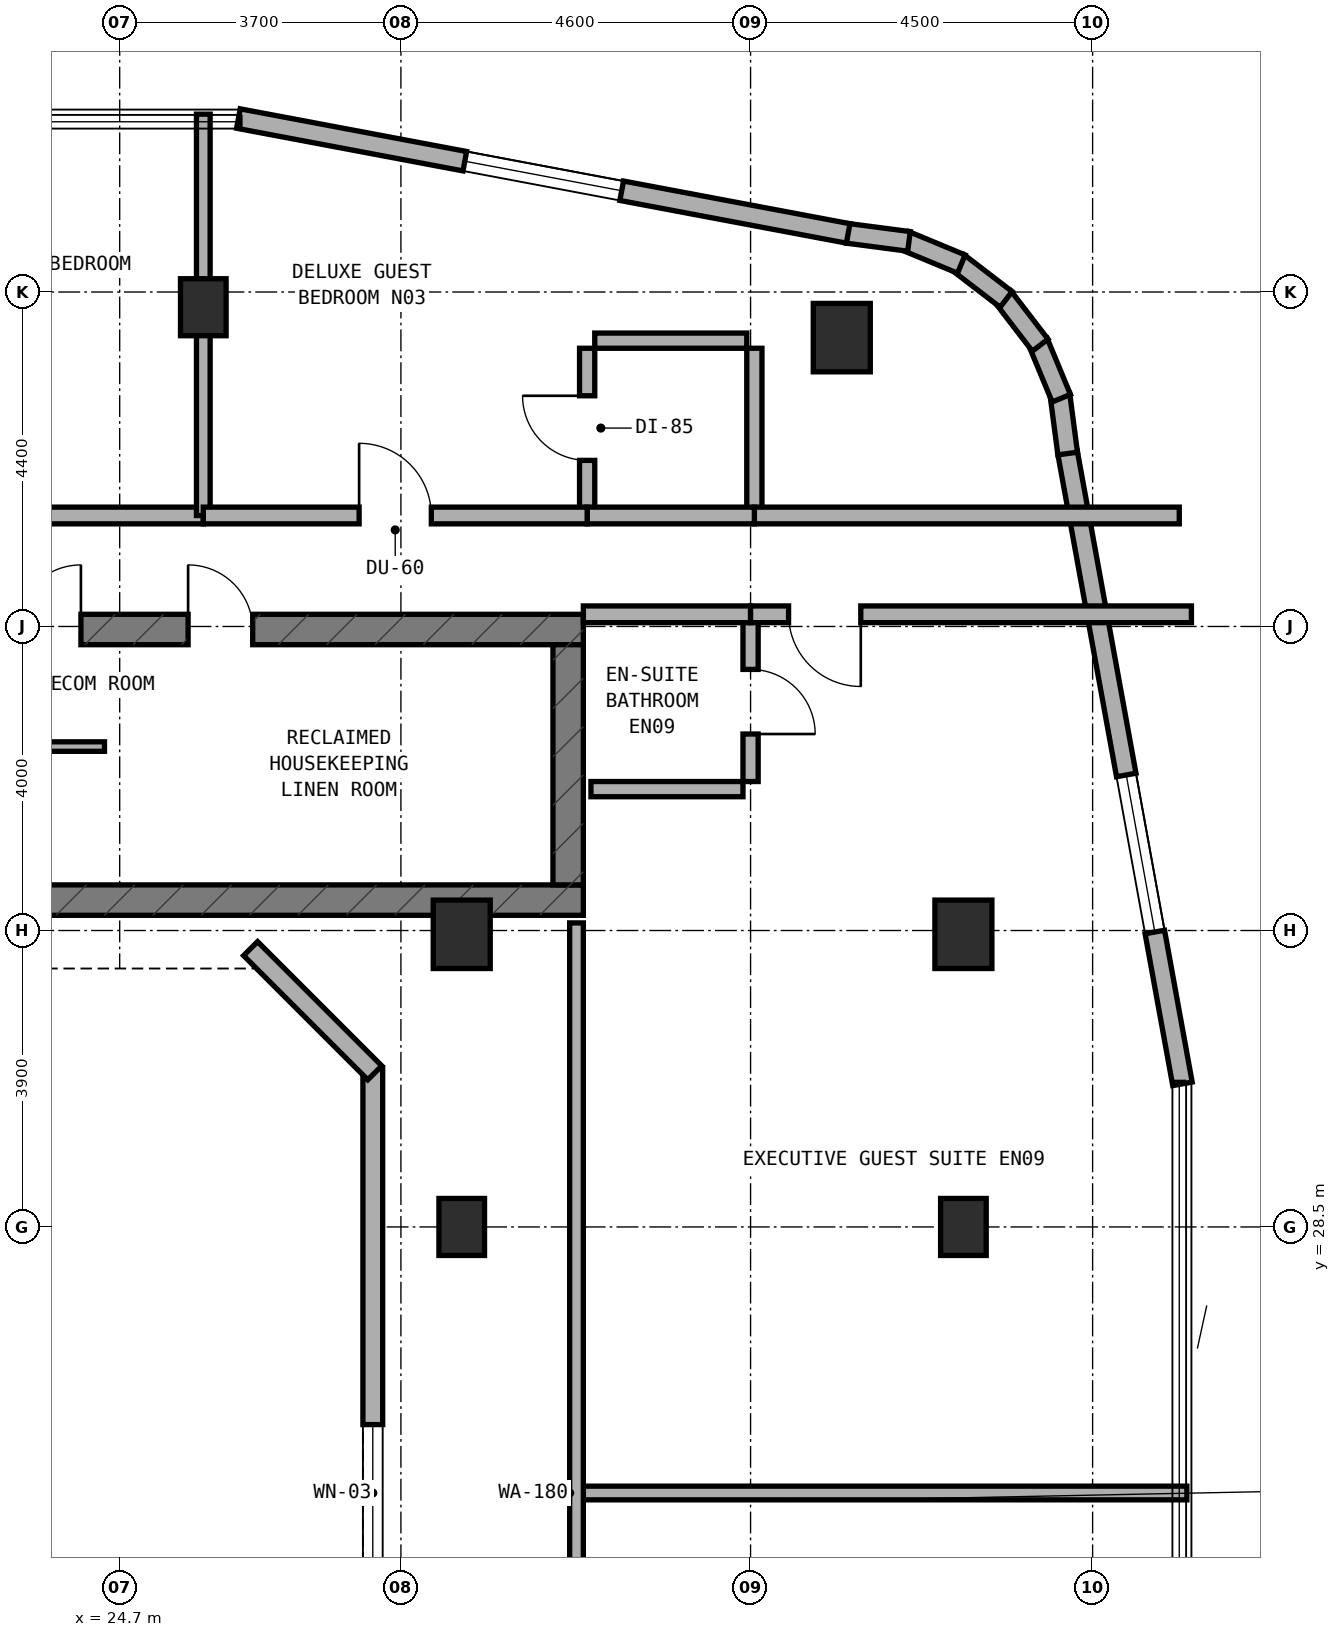
"""IFC4 building model, lengths in metres.
Left out: names, types, materials, properties, quantities, classifications, styles, units other than length and angle.
Written with IfcOpenShell. Run it as: python <this file> out.ifc"""

import sys

from ifc_helpers import new_model, si_unit, direction, frame, frame_2d, origin, origin_2d, place, context, subcontext, project, spatial, rectangle, extrude, element, fill, save


model = new_model("IFC4")
c1 = context("Model", 3, precision=1e-05, world=origin(), true_north=direction((0.0, 1.0)))
c2 = subcontext(c1, "Body", "Model", "MODEL_VIEW")
j1 = project(units=[si_unit("LENGTHUNIT", "METRE"), si_unit("PLANEANGLEUNIT", "RADIAN")], contexts=[c1])
p1 = place(None, origin())
s1 = spatial("IfcSite", under=j1, at=p1, CompositionType="ELEMENT")
p2 = place(p1, origin())
s2 = spatial("IfcBuilding", under=s1, at=p2, CompositionType="ELEMENT")
p3 = place(p2, frame((0.0, 0.0, 250.4)))
s3 = spatial("IfcBuildingStorey", under=s2, at=p3, CompositionType="ELEMENT", Elevation=250.4)
p4 = place(p3, frame((6.4, 32.8, 0.0), z_axis=(0.0, 0.0, 1.0), x_axis=(1.0, 0.0, 0.0)))
e1 = element("IfcWall", 1, at=p4, inside=s3, PredefinedType="SHEAR", context=c2, shape_type="SweptSolid", body=[
    extrude(rectangle(XDim=24.4, YDim=0.4, at=frame_2d((12.2, 0.0))), origin(), (0.0, 0.0, 1.0), 3.6),
])
p5 = place(p4, frame((6.05, 0.0, 0.0)))
e2 = element("IfcOpeningElement", 2, at=p5, cuts=e1, PredefinedType="OPENING", context=c2, shape_type="SweptSolid", body=[
    extrude(rectangle(XDim=1.1, YDim=2.15, at=frame_2d((0.55, 1.075))), frame((0.0, 0.21, 0.0), z_axis=(0.0, -1.0, 0.0), x_axis=(1.0, 0.0, 0.0)), (0.0, 0.0, 1.0), 0.42),
])
p6 = place(p3, frame((6.4, 36.36, 0.0), z_axis=(0.0, 0.0, 1.0), x_axis=(1.0, 0.0, 0.0)))
e3 = element("IfcWall", 3, at=p6, inside=s3, PredefinedType="SHEAR", context=c2, shape_type="SweptSolid", body=[
    extrude(rectangle(XDim=24.4, YDim=0.4, at=frame_2d((12.2, 0.0))), origin(), (0.0, 0.0, 1.0), 3.6),
])
p7 = place(p6, frame((9.15, 0.0, 0.0)))
e4 = element("IfcOpeningElement", 4, at=p7, cuts=e3, PredefinedType="OPENING", context=c2, shape_type="SweptSolid", body=[
    extrude(rectangle(XDim=1.2, YDim=2.15, at=frame_2d((0.6, 1.075))), frame((0.0, 0.21, 0.0), z_axis=(0.0, -1.0, 0.0), x_axis=(1.0, 0.0, 0.0)), (0.0, 0.0, 1.0), 0.42),
])
p8 = place(p6, frame((19.2, 0.0, 0.0)))
e5 = element("IfcOpeningElement", 5, at=p8, cuts=e3, PredefinedType="OPENING", context=c2, shape_type="SweptSolid", body=[
    extrude(rectangle(XDim=0.85, YDim=2.1, at=frame_2d((0.425, 1.05))), frame((0.0, 0.21, 0.0), z_axis=(0.0, -1.0, 0.0), x_axis=(1.0, 0.0, 0.0)), (0.0, 0.0, 1.0), 0.42),
])
p9 = place(p6, frame((16.94, 0.0, 0.0)))
e6 = element("IfcOpeningElement", 6, at=p9, cuts=e3, PredefinedType="OPENING", context=c2, shape_type="SweptSolid", body=[
    extrude(rectangle(XDim=0.85, YDim=2.1, at=frame_2d((0.425, 1.05))), frame((0.0, 0.21, 0.0), z_axis=(0.0, -1.0, 0.0), x_axis=(1.0, 0.0, 0.0)), (0.0, 0.0, 1.0), 0.42),
])
p10 = place(p3, frame((30.6, 33.0, 0.0), z_axis=(0.0, 0.0, 1.0), x_axis=(0.0, 1.0, 0.0)))
e7 = element("IfcWall", 7, at=p10, inside=s3, PredefinedType="SHEAR", context=c2, shape_type="SweptSolid", body=[
    extrude(rectangle(XDim=3.16, YDim=0.4, at=frame_2d((1.58, 0.0))), origin(), (0.0, 0.0, 1.0), 3.6),
])
p11 = place(p3, frame((25.8, 40.6, 0.0), z_axis=(0.0, 0.0, 1.0), x_axis=(1.0, 0.0, 0.0)))
e8 = element("IfcColumn", 8, at=p11, inside=s3, PredefinedType="COLUMN", context=c2, shape_type="SweptSolid", body=[
    extrude(rectangle(XDim=0.6, YDim=0.75, at=origin_2d()), origin(), (0.0, 0.0, 1.0), 3.6),
])
p12 = place(p3, frame((34.2, 40.2, 0.0), z_axis=(0.0, 0.0, 1.0), x_axis=(1.0, 0.0, 0.0)))
e9 = element("IfcColumn", 9, at=p12, inside=s3, PredefinedType="COLUMN", context=c2, shape_type="SweptSolid", body=[
    extrude(rectangle(XDim=0.75, YDim=0.9, at=origin_2d()), origin(), (0.0, 0.0, 1.0), 3.6),
])
p13 = place(p3, frame((35.8, 28.5, 0.0), z_axis=(0.0, 0.0, 1.0), x_axis=(1.0, 0.0, 0.0)))
e10 = element("IfcColumn", 10, at=p13, inside=s3, PredefinedType="COLUMN", context=c2, shape_type="SweptSolid", body=[
    extrude(rectangle(XDim=0.6, YDim=0.75, at=origin_2d()), origin(), (0.0, 0.0, 1.0), 3.6),
])
for number, where, z_axis, x_axis in (
    (11, (35.8, 32.35, 0.0), (0.0, 0.0, 1.0), (1.0, 0.0, 0.0)),
    (12, (29.2, 32.35, 0.0), (0.0, 0.0, 1.0), (1.0, 0.0, 0.0)),
):
    element("IfcColumn", number, at=place(p3, frame(where, z_axis=z_axis, x_axis=x_axis)), inside=s3, PredefinedType="COLUMN", context=c2, shape_type="SweptSolid", body=[
        extrude(rectangle(XDim=0.75, YDim=0.9, at=origin_2d()), origin(), (0.0, 0.0, 1.0), 3.6),
    ])
p14 = place(p3, frame((29.2, 28.5, 0.0), z_axis=(0.0, 0.0, 1.0), x_axis=(1.0, 0.0, 0.0)))
e13 = element("IfcColumn", 13, at=p14, inside=s3, PredefinedType="COLUMN", context=c2, shape_type="SweptSolid", body=[
    extrude(rectangle(XDim=0.6, YDim=0.75, at=origin_2d()), origin(), (0.0, 0.0, 1.0), 3.6),
])
p15 = place(p3, frame((38.682, 30.383, 0.0), z_axis=(0.0, 0.0, 1.0), x_axis=(-0.179061111398, 0.983837953316, 0.0)))
e14 = element("IfcWall", 14, at=p15, inside=s3, PredefinedType="STANDARD", context=c2, shape_type="SweptSolid", body=[
    extrude(rectangle(XDim=8.438, YDim=0.26, at=frame_2d((4.219, 0.0))), origin(), (0.0, 0.0, 1.0), 3.32),
])
p16 = place(p15, frame((2.03, 0.0, 0.85)))
e15 = element("IfcOpeningElement", 15, at=p16, cuts=e14, PredefinedType="OPENING", context=c2, shape_type="SweptSolid", body=[
    extrude(rectangle(XDim=2.1, YDim=1.5, at=frame_2d((1.05, 0.75))), frame((0.0, 0.14, 0.0), z_axis=(0.0, -1.0, 0.0), x_axis=(1.0, 0.0, 0.0)), (0.0, 0.0, 1.0), 0.28),
])
p17 = place(p3, frame((37.172, 38.675, 0.0), z_axis=(0.0, 0.0, 1.0), x_axis=(-0.130729574419, 0.991418064377, 0.0)))
e16 = element("IfcWall", 16, at=p17, inside=s3, PredefinedType="STANDARD", context=c2, shape_type="SweptSolid", body=[
    extrude(rectangle(XDim=0.781, YDim=0.26, at=frame_2d((0.39, 0.0))), origin(), (0.0, 0.0, 1.0), 3.32),
])
p18 = place(p3, frame((37.088, 39.403, 0.0), z_axis=(0.0, 0.0, 1.0), x_axis=(-0.382900540965, 0.923789573295, 0.0)))
e17 = element("IfcWall", 17, at=p18, inside=s3, PredefinedType="STANDARD", context=c2, shape_type="SweptSolid", body=[
    extrude(rectangle(XDim=0.799, YDim=0.26, at=frame_2d((0.399, 0.0))), origin(), (0.0, 0.0, 1.0), 3.32),
])
p19 = place(p3, frame((36.81, 40.101, 0.0), z_axis=(0.0, 0.0, 1.0), x_axis=(-0.60916352983, 0.793044635519, 0.0)))
e18 = element("IfcWall", 18, at=p19, inside=s3, PredefinedType="STANDARD", context=c2, shape_type="SweptSolid", body=[
    extrude(rectangle(XDim=0.798, YDim=0.26, at=frame_2d((0.399, 0.0))), origin(), (0.0, 0.0, 1.0), 3.32),
])
p20 = place(p3, frame((36.362, 40.703, 0.0), z_axis=(0.0, 0.0, 1.0), x_axis=(-0.793158129381, 0.609015748398, 0.0)))
e19 = element("IfcWall", 19, at=p20, inside=s3, PredefinedType="STANDARD", context=c2, shape_type="SweptSolid", body=[
    extrude(rectangle(XDim=0.798, YDim=0.26, at=frame_2d((0.399, 0.0))), origin(), (0.0, 0.0, 1.0), 3.32),
])
p21 = place(p3, frame((35.773, 41.168, 0.0), z_axis=(0.0, 0.0, 1.0), x_axis=(-0.923681457047, 0.383161279238, 0.0)))
e20 = element("IfcWall", 20, at=p21, inside=s3, PredefinedType="STANDARD", context=c2, shape_type="SweptSolid", body=[
    extrude(rectangle(XDim=0.799, YDim=0.26, at=frame_2d((0.399, 0.0))), origin(), (0.0, 0.0, 1.0), 3.32),
])
p22 = place(p3, frame((35.084, 41.466, 0.0), z_axis=(0.0, 0.0, 1.0), x_axis=(-0.99153354416, 0.129850802102, 0.0)))
e21 = element("IfcWall", 21, at=p22, inside=s3, PredefinedType="STANDARD", context=c2, shape_type="SweptSolid", body=[
    extrude(rectangle(XDim=0.816, YDim=0.26, at=frame_2d((0.408, 0.0))), origin(), (0.0, 0.0, 1.0), 3.32),
])
p23 = place(p3, frame((34.284, 41.571, 0.0), z_axis=(0.0, 0.0, 1.0), x_axis=(-0.982719489139, 0.185101068789, 0.0)))
e22 = element("IfcWall", 22, at=p23, inside=s3, PredefinedType="STANDARD", context=c2, shape_type="SweptSolid", body=[
    extrude(rectangle(XDim=8.163, YDim=0.26, at=frame_2d((4.082, 0.0))), origin(), (0.0, 0.0, 1.0), 3.32),
])
p24 = place(p23, frame((3.032, 0.0, 0.85)))
e23 = element("IfcOpeningElement", 23, at=p24, cuts=e22, PredefinedType="OPENING", context=c2, shape_type="SweptSolid", body=[
    extrude(rectangle(XDim=2.1, YDim=1.5, at=frame_2d((1.05, 0.75))), frame((0.0, 0.14, 0.0), z_axis=(0.0, -1.0, 0.0), x_axis=(1.0, 0.0, 0.0)), (0.0, 0.0, 1.0), 0.28),
])
p25 = place(p3, frame((28.03, 19.41, 0.0), z_axis=(0.0, 0.0, 1.0), x_axis=(0.0, 1.0, 0.0)))
e24 = element("IfcWall", 24, at=p25, inside=s3, PredefinedType="STANDARD", context=c2, shape_type="SweptSolid", body=[
    extrude(rectangle(XDim=11.18, YDim=0.26, at=frame_2d((5.59, 0.0))), origin(), (0.0, 0.0, 1.0), 3.32),
])
p26 = place(p25, frame((4.69, 0.0, 0.85)))
e25 = element("IfcOpeningElement", 25, at=p26, cuts=e24, PredefinedType="OPENING", context=c2, shape_type="SweptSolid", body=[
    extrude(rectangle(XDim=1.8, YDim=1.5, at=frame_2d((0.9, 0.75))), frame((0.0, 0.14, 0.0), z_axis=(0.0, -1.0, 0.0), x_axis=(1.0, 0.0, 0.0)), (0.0, 0.0, 1.0), 0.28),
])
p27 = place(p3, frame((28.056, 30.528, 0.0), z_axis=(0.0, 0.0, 1.0), x_axis=(-0.707053950914, 0.707159607512, 0.0)))
e26 = element("IfcWall", 26, at=p27, inside=s3, PredefinedType="STANDARD", context=c2, shape_type="SweptSolid", body=[
    extrude(rectangle(XDim=2.311, YDim=0.26, at=frame_2d((1.155, 0.0))), origin(), (0.0, 0.0, 1.0), 3.32),
])
p28 = place(p3, frame((23.15, 34.82, 0.0), z_axis=(0.0, 0.0, 1.0), x_axis=(1.0, 0.0, 0.0)))
e27 = element("IfcWall", 27, at=p28, inside=s3, PredefinedType="PARTITIONING", context=c2, shape_type="SweptSolid", body=[
    extrude(rectangle(XDim=1.35, YDim=0.125, at=frame_2d((0.675, 0.0))), origin(), (0.0, 0.0, 1.0), 3.32),
])
p29 = place(p3, frame((18.4, 37.86, 0.0), z_axis=(0.0, 0.0, 1.0), x_axis=(1.0, 0.0, 0.0)))
e28 = element("IfcWall", 28, at=p29, inside=s3, PredefinedType="SOLIDWALL", context=c2, shape_type="SweptSolid", body=[
    extrude(rectangle(XDim=7.4, YDim=0.22, at=frame_2d((3.7, 0.0))), origin(), (0.0, 0.0, 1.0), 2.745),
])
p30 = place(p29, frame((3.225, 0.0, 0.0)))
e29 = element("IfcOpeningElement", 29, at=p30, cuts=e28, PredefinedType="OPENING", context=c2, shape_type="SweptSolid", body=[
    extrude(rectangle(XDim=0.95, YDim=2.1, at=frame_2d((0.475, 1.05))), frame((0.0, 0.12, 0.0), z_axis=(0.0, -1.0, 0.0), x_axis=(1.0, 0.0, 0.0)), (0.0, 0.0, 1.0), 0.24),
])
p31 = place(p3, frame((25.8, 37.86, 0.0), z_axis=(0.0, 0.0, 1.0), x_axis=(0.0, 1.0, 0.0)))
e30 = element("IfcWall", 30, at=p31, inside=s3, PredefinedType="SOLIDWALL", context=c2, shape_type="SweptSolid", body=[
    extrude(rectangle(XDim=5.28, YDim=0.18, at=frame_2d((2.64, 0.0))), origin(), (0.0, 0.0, 1.0), 2.745),
])
p32 = place(p3, frame((30.85, 37.96, 0.0), z_axis=(0.0, 0.0, 1.0), x_axis=(0.0, 1.0, 0.0)))
e31 = element("IfcWall", 31, at=p32, inside=s3, PredefinedType="PLUMBINGWALL", context=c2, shape_type="SweptSolid", body=[
    extrude(rectangle(XDim=2.1, YDim=0.2, at=frame_2d((1.05, 0.0))), origin(), (0.0, 0.0, 1.0), 3.055),
])
p33 = place(p32, frame((0.625, 0.0, 0.0)))
e32 = element("IfcOpeningElement", 32, at=p33, cuts=e31, PredefinedType="OPENING", context=c2, shape_type="SweptSolid", body=[
    extrude(rectangle(XDim=0.85, YDim=2.1, at=frame_2d((0.425, 1.05))), frame((0.0, 0.11, 0.0), z_axis=(0.0, -1.0, 0.0), x_axis=(1.0, 0.0, 0.0)), (0.0, 0.0, 1.0), 0.22),
])
p34 = place(p3, frame((30.95, 40.16, 0.0), z_axis=(0.0, 0.0, 1.0), x_axis=(1.0, 0.0, 0.0)))
e33 = element("IfcWall", 33, at=p34, inside=s3, PredefinedType="PLUMBINGWALL", context=c2, shape_type="SweptSolid", body=[
    extrude(rectangle(XDim=2.0, YDim=0.2, at=frame_2d((1.0, 0.0))), origin(), (0.0, 0.0, 1.0), 3.015),
])
p35 = place(p3, frame((33.05, 37.96, 0.0), z_axis=(0.0, 0.0, 1.0), x_axis=(0.0, 1.0, 0.0)))
e34 = element("IfcWall", 34, at=p35, inside=s3, PredefinedType="PLUMBINGWALL", context=c2, shape_type="SweptSolid", body=[
    extrude(rectangle(XDim=2.1, YDim=0.2, at=frame_2d((1.05, 0.0))), origin(), (0.0, 0.0, 1.0), 3.055),
])
p36 = place(p3, frame((33.05, 37.86, 0.0), z_axis=(0.0, 0.0, 1.0), x_axis=(1.0, 0.0, 0.0)))
e35 = element("IfcWall", 35, at=p36, inside=s3, PredefinedType="SOLIDWALL", context=c2, shape_type="SweptSolid", body=[
    extrude(rectangle(XDim=5.59, YDim=0.22, at=frame_2d((2.795, 0.0))), origin(), (0.0, 0.0, 1.0), 2.745),
])
p37 = place(p3, frame((30.85, 37.86, 0.0), z_axis=(0.0, 0.0, 1.0), x_axis=(1.0, 0.0, 0.0)))
e36 = element("IfcWall", 36, at=p37, inside=s3, PredefinedType="SOLIDWALL", context=c2, shape_type="SweptSolid", body=[
    extrude(rectangle(XDim=2.2, YDim=0.22, at=frame_2d((1.1, 0.0))), origin(), (0.0, 0.0, 1.0), 3.32),
])
p38 = place(p3, frame((25.8, 37.86, 0.0), z_axis=(0.0, 0.0, 1.0), x_axis=(1.0, 0.0, 0.0)))
e37 = element("IfcWall", 37, at=p38, inside=s3, PredefinedType="SOLIDWALL", context=c2, shape_type="SweptSolid", body=[
    extrude(rectangle(XDim=5.05, YDim=0.22, at=frame_2d((2.525, 0.0))), origin(), (0.0, 0.0, 1.0), 2.745),
])
p39 = place(p38, frame((2.05, 0.0, 0.0)))
e38 = element("IfcOpeningElement", 38, at=p39, cuts=e37, PredefinedType="OPENING", context=c2, shape_type="SweptSolid", body=[
    extrude(rectangle(XDim=0.95, YDim=2.1, at=frame_2d((0.475, 1.05))), frame((0.0, 0.12, 0.0), z_axis=(0.0, -1.0, 0.0), x_axis=(1.0, 0.0, 0.0)), (0.0, 0.0, 1.0), 0.24),
])
p40 = place(p3, frame((30.8, 25.0, 0.0), z_axis=(0.0, 0.0, 1.0), x_axis=(1.0, 0.0, 0.0)))
e39 = element("IfcWall", 39, at=p40, inside=s3, PredefinedType="SOLIDWALL", context=c2, shape_type="SweptSolid", body=[
    extrude(rectangle(XDim=7.94, YDim=0.18, at=frame_2d((3.97, 0.0))), origin(), (0.0, 0.0, 1.0), 3.015),
])
p41 = place(p3, frame((30.71, 17.5, 0.0), z_axis=(0.0, 0.0, 1.0), x_axis=(0.0, 1.0, 0.0)))
e40 = element("IfcWall", 40, at=p41, inside=s3, PredefinedType="SOLIDWALL", context=c2, shape_type="SweptSolid", body=[
    extrude(rectangle(XDim=15.0, YDim=0.18, at=frame_2d((7.5, 0.0))), origin(), (0.0, 0.0, 1.0), 2.745),
])
p42 = place(p3, frame((33.0, 34.36, 0.0), z_axis=(0.0, 0.0, 1.0), x_axis=(0.0, 1.0, 0.0)))
e41 = element("IfcWall", 41, at=p42, inside=s3, PredefinedType="PLUMBINGWALL", context=c2, shape_type="SweptSolid", body=[
    extrude(rectangle(XDim=2.1, YDim=0.2, at=frame_2d((1.05, 0.0))), origin(), (0.0, 0.0, 1.0), 3.32),
])
p43 = place(p42, frame((0.625, 0.0, 0.0)))
e42 = element("IfcOpeningElement", 42, at=p43, cuts=e41, PredefinedType="OPENING", context=c2, shape_type="SweptSolid", body=[
    extrude(rectangle(XDim=0.85, YDim=2.1, at=frame_2d((0.425, 1.05))), frame((0.0, 0.11, 0.0), z_axis=(0.0, -1.0, 0.0), x_axis=(1.0, 0.0, 0.0)), (0.0, 0.0, 1.0), 0.22),
])
p44 = place(p3, frame((30.9, 34.26, 0.0), z_axis=(0.0, 0.0, 1.0), x_axis=(1.0, 0.0, 0.0)))
e43 = element("IfcWall", 43, at=p44, inside=s3, PredefinedType="PLUMBINGWALL", context=c2, shape_type="SweptSolid", body=[
    extrude(rectangle(XDim=2.0, YDim=0.2, at=frame_2d((1.0, 0.0))), origin(), (0.0, 0.0, 1.0), 3.32),
])
p45 = place(p3, frame((30.8, 36.56, 0.0), z_axis=(0.0, 0.0, 1.0), x_axis=(1.0, 0.0, 0.0)))
e44 = element("IfcWall", 44, at=p45, inside=s3, PredefinedType="SOLIDWALL", context=c2, shape_type="SweptSolid", body=[
    extrude(rectangle(XDim=2.2, YDim=0.22, at=frame_2d((1.1, 0.0))), origin(), (0.0, 0.0, 1.0), 3.32),
])
p46 = place(p3, frame((33.0, 36.56, 0.0), z_axis=(0.0, 0.0, 1.0), x_axis=(1.0, 0.0, 0.0)))
e45 = element("IfcWall", 45, at=p46, inside=s3, PredefinedType="SOLIDWALL", context=c2, shape_type="SweptSolid", body=[
    extrude(rectangle(XDim=5.8, YDim=0.22, at=frame_2d((2.9, 0.0))), origin(), (0.0, 0.0, 1.0), 2.745),
])
p47 = place(p46, frame((0.5, 0.0, 0.0)))
e46 = element("IfcOpeningElement", 46, at=p47, cuts=e45, PredefinedType="OPENING", context=c2, shape_type="SweptSolid", body=[
    extrude(rectangle(XDim=0.95, YDim=2.1, at=frame_2d((0.475, 1.05))), frame((0.0, 0.12, 0.0), z_axis=(0.0, -1.0, 0.0), x_axis=(1.0, 0.0, 0.0)), (0.0, 0.0, 1.0), 0.24),
])
p48 = place(p16, origin())
e47 = element("IfcWindow", 47, at=p48, inside=s3, PartitioningType="SINGLE_PANEL", PredefinedType="WINDOW", context=c2, shape_type="SweptSolid", body=[
    extrude(rectangle(XDim=2.1, YDim=1.5, at=frame_2d((1.05, 0.75))), frame((0.0, 0.03, 0.0), z_axis=(0.0, -1.0, 0.0), x_axis=(1.0, 0.0, 0.0)), (0.0, 0.0, 1.0), 0.06),
])
fill(e15, e47)
p49 = place(p24, origin())
e48 = element("IfcWindow", 48, at=p49, inside=s3, PartitioningType="SINGLE_PANEL", PredefinedType="WINDOW", context=c2, shape_type="SweptSolid", body=[
    extrude(rectangle(XDim=2.1, YDim=1.5, at=frame_2d((1.05, 0.75))), frame((0.0, 0.03, 0.0), z_axis=(0.0, -1.0, 0.0), x_axis=(1.0, 0.0, 0.0)), (0.0, 0.0, 1.0), 0.06),
])
fill(e23, e48)
p50 = place(p26, origin())
e49 = element("IfcWindow", 49, at=p50, inside=s3, PartitioningType="SINGLE_PANEL", PredefinedType="WINDOW", context=c2, shape_type="SweptSolid", body=[
    extrude(rectangle(XDim=1.8, YDim=1.5, at=frame_2d((0.9, 0.75))), frame((0.0, 0.03, 0.0), z_axis=(0.0, -1.0, 0.0), x_axis=(1.0, 0.0, 0.0)), (0.0, 0.0, 1.0), 0.06),
])
fill(e25, e49)
p51 = place(p8, origin())
e50 = element("IfcDoor", 50, at=p51, inside=s3, OperationType="SINGLE_SWING_LEFT", PredefinedType="DOOR", context=c2, shape_type="SweptSolid", body=[
    extrude(rectangle(XDim=0.85, YDim=2.1, at=frame_2d((0.425, 1.05))), frame((0.0, 0.025, 0.0), z_axis=(0.0, -1.0, 0.0), x_axis=(1.0, 0.0, 0.0)), (0.0, 0.0, 1.0), 0.05),
])
fill(e5, e50)
p52 = place(p9, origin())
e51 = element("IfcDoor", 51, at=p52, inside=s3, OperationType="SINGLE_SWING_RIGHT", PredefinedType="DOOR", context=c2, shape_type="SweptSolid", body=[
    extrude(rectangle(XDim=0.85, YDim=2.1, at=frame_2d((0.425, 1.05))), frame((0.0, 0.025, 0.0), z_axis=(0.0, -1.0, 0.0), x_axis=(1.0, 0.0, 0.0)), (0.0, 0.0, 1.0), 0.05),
])
fill(e6, e51)
p53 = place(p33, origin())
e52 = element("IfcDoor", 52, at=p53, inside=s3, OperationType="SINGLE_SWING_RIGHT", PredefinedType="DOOR", context=c2, shape_type="SweptSolid", body=[
    extrude(rectangle(XDim=0.85, YDim=2.1, at=frame_2d((0.425, 1.05))), frame((0.0, 0.025, 0.0), z_axis=(0.0, -1.0, 0.0), x_axis=(1.0, 0.0, 0.0)), (0.0, 0.0, 1.0), 0.05),
])
fill(e32, e52)
p54 = place(p39, origin())
e53 = element("IfcDoor", 53, at=p54, inside=s3, OperationType="SINGLE_SWING_LEFT", PredefinedType="DOOR", context=c2, shape_type="SweptSolid", body=[
    extrude(rectangle(XDim=0.95, YDim=2.1, at=frame_2d((0.475, 1.05))), frame((0.0, 0.025, 0.0), z_axis=(0.0, -1.0, 0.0), x_axis=(1.0, 0.0, 0.0)), (0.0, 0.0, 1.0), 0.05),
])
fill(e38, e53)
p55 = place(p43, frame((0.85, 0.0, 0.0), z_axis=(0.0, 0.0, 1.0), x_axis=(-1.0, 0.0, 0.0)))
e54 = element("IfcDoor", 54, at=p55, inside=s3, OperationType="SINGLE_SWING_RIGHT", PredefinedType="DOOR", context=c2, shape_type="SweptSolid", body=[
    extrude(rectangle(XDim=0.85, YDim=2.1, at=frame_2d((0.425, 1.05))), frame((0.0, 0.025, 0.0), z_axis=(0.0, -1.0, 0.0), x_axis=(1.0, 0.0, 0.0)), (0.0, 0.0, 1.0), 0.05),
])
fill(e42, e54)
p56 = place(p47, frame((0.95, 0.0, 0.0), z_axis=(0.0, 0.0, 1.0), x_axis=(-1.0, 0.0, 0.0)))
e55 = element("IfcDoor", 55, at=p56, inside=s3, OperationType="SINGLE_SWING_LEFT", PredefinedType="DOOR", context=c2, shape_type="SweptSolid", body=[
    extrude(rectangle(XDim=0.95, YDim=2.1, at=frame_2d((0.475, 1.05))), frame((0.0, 0.025, 0.0), z_axis=(0.0, -1.0, 0.0), x_axis=(1.0, 0.0, 0.0)), (0.0, 0.0, 1.0), 0.05),
])
fill(e46, e55)
save(model, sys.argv[1])
